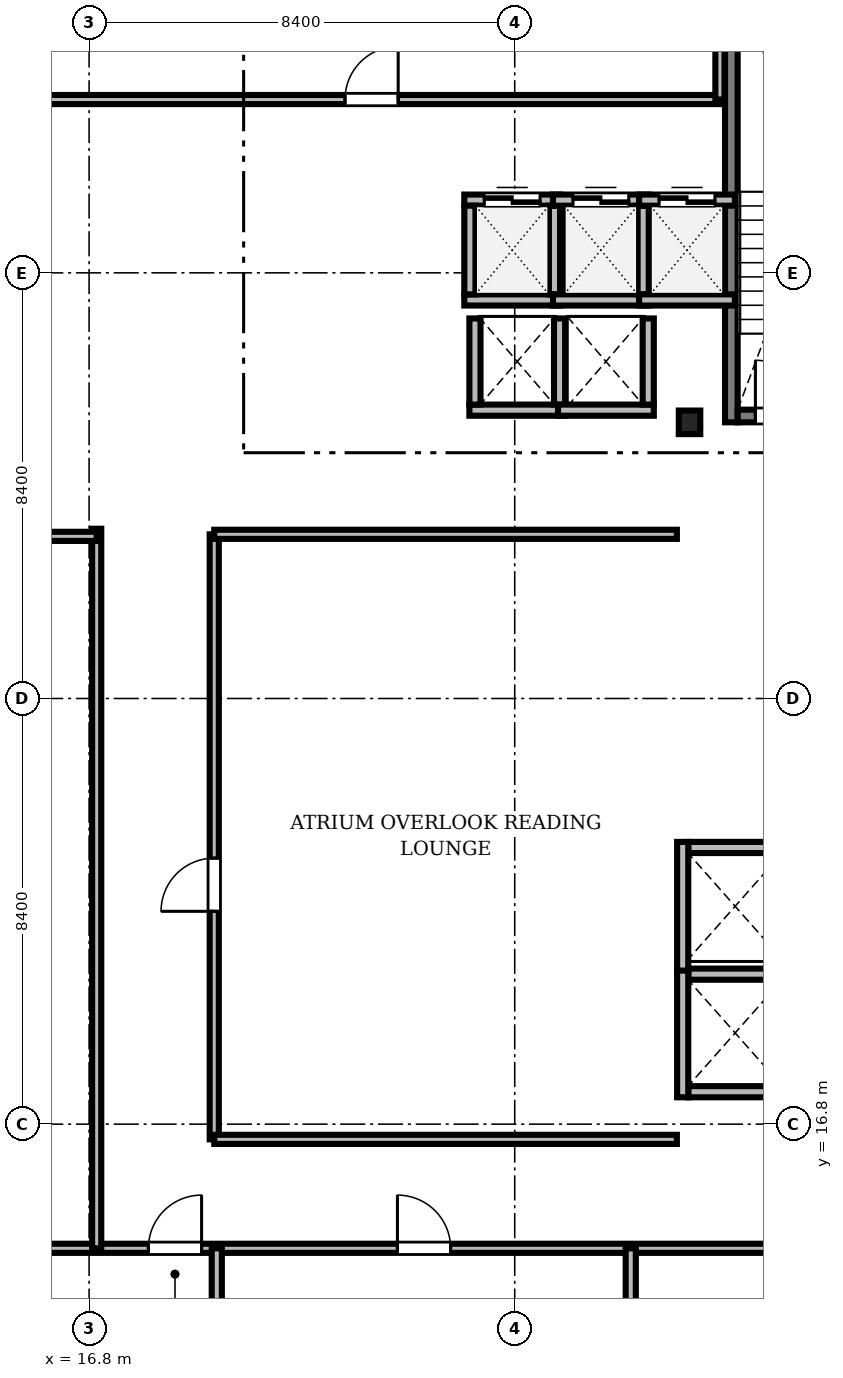
"""IFC4 building model, lengths in metres.
Left out: names, types, materials, properties, quantities, classifications, styles, units other than length and angle.
Written with IfcOpenShell. Run it as: python <this file> out.ifc"""

import sys

from ifc_helpers import new_model, si_unit, direction, frame, frame_2d, origin, origin_2d, place, context, subcontext, project, spatial, rectangle, i_section, extrude, source, transform, mapped, element, fill, save


model = new_model("IFC4")
c1 = context("Model", 3, precision=1e-05, world=origin(), true_north=direction((0.0, 1.0)))
c2 = subcontext(c1, "Body", "Model", "MODEL_VIEW")
j1 = project(units=[si_unit("LENGTHUNIT", "METRE"), si_unit("PLANEANGLEUNIT", "RADIAN")], contexts=[c1])
p1 = place(None, origin())
s1 = spatial("IfcSite", under=j1, at=p1, CompositionType="ELEMENT")
p2 = place(p1, origin())
s2 = spatial("IfcBuilding", under=s1, at=p2, CompositionType="ELEMENT")
p3 = place(p2, frame((0.0, 0.0, 163.1)))
s3 = spatial("IfcBuildingStorey", under=s2, at=p3, CompositionType="ELEMENT", Elevation=163.1)
m1 = source(origin(), c2, "Body", "SweptSolid", [
    extrude(i_section(OverallWidth=0.424, OverallDepth=0.465, WebThickness=0.035, FlangeThickness=0.056, FilletRadius=0.015, at=origin_2d()), origin(), (0.0, 0.0, 1.0), 3.05),
])
p4 = place(p3, frame((28.65, 30.65, 0.0), z_axis=(0.0, 0.0, 1.0), x_axis=(1.0, 0.0, 0.0)))
e1 = element("IfcColumn", 1, at=p4, inside=s3, PredefinedType="COLUMN", context=c2, shape_type="MappedRepresentation", body=[
    mapped(m1, transform((0.0, 0.0, 0.0), scale=1.0)),
])
m2 = source(origin(), c2, "Body", "SweptSolid", [
    extrude(rectangle(XDim=9.25, YDim=0.25, at=frame_2d((4.625, 0.0))), origin(), (0.0, 0.0, 1.0), 3.5),
])
p5 = place(p3, frame((29.475, 30.65, 0.0), z_axis=(0.0, 0.0, 1.0), x_axis=(0.0, 1.0, 0.0)))
e2 = element("IfcWall", 2, at=p5, inside=s3, PredefinedType="SOLIDWALL", context=c2, shape_type="MappedRepresentation", body=[
    mapped(m2, transform((0.0, 0.0, 0.0), scale=1.0)),
])
m3 = source(origin(), c2, "Body", "SweptSolid", [
    extrude(rectangle(XDim=3.15, YDim=0.25, at=frame_2d((1.575, 0.0))), origin(), (0.0, 0.0, 1.0), 3.5),
])
p6 = place(p3, frame((29.6, 30.775, 0.0), z_axis=(0.0, 0.0, 1.0), x_axis=(1.0, 0.0, 0.0)))
e3 = element("IfcWall", 3, at=p6, inside=s3, PredefinedType="SOLIDWALL", context=c2, shape_type="MappedRepresentation", body=[
    mapped(m3, transform((0.0, 0.0, 0.0), scale=1.0)),
])
m4 = source(origin(), c2, "Body", "SweptSolid", [
    extrude(rectangle(XDim=1.1, YDim=2.2, at=frame_2d((0.55, 1.1))), frame((0.0, 0.135, 0.0), z_axis=(0.0, -1.0, 0.0), x_axis=(1.0, 0.0, 0.0)), (0.0, 0.0, 1.0), 0.27),
])
p7 = place(p6, frame((0.35, 0.0, 0.0)))
e4 = element("IfcOpeningElement", 4, at=p7, cuts=e3, PredefinedType="OPENING", context=c2, shape_type="MappedRepresentation", body=[
    mapped(m4, transform((0.0, 0.0, 0.0), scale=1.0)),
])
m5 = source(origin(), c2, "Body", "SweptSolid", [
    extrude(rectangle(XDim=1.89, YDim=0.22, at=frame_2d((0.945, 0.0))), origin(), (0.0, 0.0, 1.0), 3.05),
])
p8 = place(p3, frame((24.205, 33.065, 0.0), z_axis=(0.0, 0.0, 1.0), x_axis=(1.0, 0.0, 0.0)))
e5 = element("IfcWall", 5, at=p8, inside=s3, PredefinedType="SOLIDWALL", context=c2, shape_type="MappedRepresentation", body=[
    mapped(m5, transform((0.0, 0.0, 0.0), scale=1.0)),
])
p9 = place(p3, frame((24.205, 35.035, 0.0), z_axis=(0.0, 0.0, 1.0), x_axis=(1.0, 0.0, 0.0)))
e6 = element("IfcWall", 6, at=p9, inside=s3, PredefinedType="SOLIDWALL", context=c2, shape_type="MappedRepresentation", body=[
    mapped(m5, transform((0.0, 0.0, 0.0), scale=1.0)),
])
m6 = source(origin(), c2, "Body", "SweptSolid", [
    extrude(rectangle(XDim=1.1, YDim=2.2, at=frame_2d((0.55, 1.1))), frame((0.0, 0.12, 0.0), z_axis=(0.0, -1.0, 0.0), x_axis=(1.0, 0.0, 0.0)), (0.0, 0.0, 1.0), 0.24),
])
p10 = place(p9, frame((0.395, 0.0, 0.0)))
e7 = element("IfcOpeningElement", 7, at=p10, cuts=e6, PredefinedType="OPENING", context=c2, shape_type="MappedRepresentation", body=[
    mapped(m6, transform((0.0, 0.0, 0.0), scale=1.0)),
])
m7 = source(origin(), c2, "Body", "SweptSolid", [
    extrude(rectangle(XDim=1.75, YDim=0.22, at=frame_2d((0.875, 0.0))), origin(), (0.0, 0.0, 1.0), 3.05),
])
for number, where, z_axis, x_axis in (
    (8, (24.315, 33.175, 0.0), (0.0, 0.0, 1.0), (0.0, 1.0, 0.0)),
    (9, (25.985, 33.175, 0.0), (0.0, 0.0, 1.0), (0.0, 1.0, 0.0)),
):
    element("IfcWall", number, at=place(p3, frame(where, z_axis=z_axis, x_axis=x_axis)), inside=s3, PredefinedType="SOLIDWALL", context=c2, shape_type="MappedRepresentation", body=[
        mapped(m7, transform((0.0, 0.0, 0.0), scale=1.0)),
    ])
p11 = place(p3, frame((25.955, 33.065, 0.0), z_axis=(0.0, 0.0, 1.0), x_axis=(1.0, 0.0, 0.0)))
e10 = element("IfcWall", 10, at=p11, inside=s3, PredefinedType="SOLIDWALL", context=c2, shape_type="MappedRepresentation", body=[
    mapped(m5, transform((0.0, 0.0, 0.0), scale=1.0)),
])
p12 = place(p3, frame((25.955, 35.035, 0.0), z_axis=(0.0, 0.0, 1.0), x_axis=(1.0, 0.0, 0.0)))
e11 = element("IfcWall", 11, at=p12, inside=s3, PredefinedType="SOLIDWALL", context=c2, shape_type="MappedRepresentation", body=[
    mapped(m5, transform((0.0, 0.0, 0.0), scale=1.0)),
])
p13 = place(p12, frame((0.395, 0.0, 0.0)))
e12 = element("IfcOpeningElement", 12, at=p13, cuts=e11, PredefinedType="OPENING", context=c2, shape_type="MappedRepresentation", body=[
    mapped(m6, transform((0.0, 0.0, 0.0), scale=1.0)),
])
p14 = place(p3, frame((27.735, 33.175, 0.0), z_axis=(0.0, 0.0, 1.0), x_axis=(0.0, 1.0, 0.0)))
e13 = element("IfcWall", 13, at=p14, inside=s3, PredefinedType="SOLIDWALL", context=c2, shape_type="MappedRepresentation", body=[
    mapped(m7, transform((0.0, 0.0, 0.0), scale=1.0)),
])
p15 = place(p3, frame((27.655, 33.065, 0.0), z_axis=(0.0, 0.0, 1.0), x_axis=(1.0, 0.0, 0.0)))
e14 = element("IfcWall", 14, at=p15, inside=s3, PredefinedType="SOLIDWALL", context=c2, shape_type="MappedRepresentation", body=[
    mapped(m5, transform((0.0, 0.0, 0.0), scale=1.0)),
])
p16 = place(p3, frame((27.655, 35.035, 0.0), z_axis=(0.0, 0.0, 1.0), x_axis=(1.0, 0.0, 0.0)))
e15 = element("IfcWall", 15, at=p16, inside=s3, PredefinedType="SOLIDWALL", context=c2, shape_type="MappedRepresentation", body=[
    mapped(m5, transform((0.0, 0.0, 0.0), scale=1.0)),
])
p17 = place(p16, frame((0.395, 0.0, 0.0)))
e16 = element("IfcOpeningElement", 16, at=p17, cuts=e15, PredefinedType="OPENING", context=c2, shape_type="MappedRepresentation", body=[
    mapped(m6, transform((0.0, 0.0, 0.0), scale=1.0)),
])
m8 = source(origin(), c2, "Body", "SweptSolid", [
    extrude(rectangle(XDim=1.89, YDim=0.22, at=frame_2d((0.945, 0.0))), origin(), (0.0, 0.0, 1.0), 3.05),
])
p18 = place(p3, frame((24.305, 30.89, 0.0), z_axis=(0.0, 0.0, 1.0), x_axis=(1.0, 0.0, 0.0)))
e17 = element("IfcWall", 17, at=p18, inside=s3, PredefinedType="SOLIDWALL", context=c2, shape_type="MappedRepresentation", body=[
    mapped(m8, transform((0.0, 0.0, 0.0), scale=1.0)),
])
m9 = source(origin(), c2, "Body", "SweptSolid", [
    extrude(rectangle(XDim=1.7, YDim=0.22, at=frame_2d((0.85, 0.0))), origin(), (0.0, 0.0, 1.0), 3.05),
])
for number, where, z_axis, x_axis in (
    (18, (24.415, 31.0, 0.0), (0.0, 0.0, 1.0), (0.0, 1.0, 0.0)),
    (19, (26.085, 31.0, 0.0), (0.0, 0.0, 1.0), (0.0, 1.0, 0.0)),
):
    element("IfcWall", number, at=place(p3, frame(where, z_axis=z_axis, x_axis=x_axis)), inside=s3, PredefinedType="SOLIDWALL", context=c2, shape_type="MappedRepresentation", body=[
        mapped(m9, transform((0.0, 0.0, 0.0), scale=1.0)),
    ])
p19 = place(p3, frame((26.055, 30.89, 0.0), z_axis=(0.0, 0.0, 1.0), x_axis=(1.0, 0.0, 0.0)))
e20 = element("IfcWall", 20, at=p19, inside=s3, PredefinedType="SOLIDWALL", context=c2, shape_type="MappedRepresentation", body=[
    mapped(m8, transform((0.0, 0.0, 0.0), scale=1.0)),
])
p20 = place(p3, frame((27.835, 31.0, 0.0), z_axis=(0.0, 0.0, 1.0), x_axis=(0.0, 1.0, 0.0)))
e21 = element("IfcWall", 21, at=p20, inside=s3, PredefinedType="SOLIDWALL", context=c2, shape_type="MappedRepresentation", body=[
    mapped(m9, transform((0.0, 0.0, 0.0), scale=1.0)),
])
m10 = source(origin(), c2, "Body", "SweptSolid", [
    extrude(rectangle(XDim=1.85, YDim=0.22, at=frame_2d((0.925, 0.0))), origin(), (0.0, 0.0, 1.0), 3.05),
])
for number, where, z_axis, x_axis in (
    (22, (28.625, 17.44, 0.0), (0.0, 0.0, 1.0), (1.0, 0.0, 0.0)),
    (23, (28.625, 19.76, 0.0), (0.0, 0.0, 1.0), (1.0, 0.0, 0.0)),
):
    element("IfcWall", number, at=place(p3, frame(where, z_axis=z_axis, x_axis=x_axis)), inside=s3, PredefinedType="SOLIDWALL", context=c2, shape_type="MappedRepresentation", body=[
        mapped(m10, transform((0.0, 0.0, 0.0), scale=1.0)),
    ])
m11 = source(origin(), c2, "Body", "SweptSolid", [
    extrude(rectangle(XDim=2.54, YDim=0.22, at=frame_2d((1.27, 0.0))), origin(), (0.0, 0.0, 1.0), 3.05),
])
p21 = place(p3, frame((28.515, 17.33, 0.0), z_axis=(0.0, 0.0, 1.0), x_axis=(0.0, 1.0, 0.0)))
e24 = element("IfcWall", 24, at=p21, inside=s3, PredefinedType="SOLIDWALL", context=c2, shape_type="MappedRepresentation", body=[
    mapped(m11, transform((0.0, 0.0, 0.0), scale=1.0)),
])
p22 = place(p3, frame((28.625, 22.26, 0.0), z_axis=(0.0, 0.0, 1.0), x_axis=(1.0, 0.0, 0.0)))
e25 = element("IfcWall", 25, at=p22, inside=s3, PredefinedType="SOLIDWALL", context=c2, shape_type="MappedRepresentation", body=[
    mapped(m10, transform((0.0, 0.0, 0.0), scale=1.0)),
])
p23 = place(p3, frame((28.515, 19.83, 0.0), z_axis=(0.0, 0.0, 1.0), x_axis=(0.0, 1.0, 0.0)))
e26 = element("IfcWall", 26, at=p23, inside=s3, PredefinedType="SOLIDWALL", context=c2, shape_type="MappedRepresentation", body=[
    mapped(m11, transform((0.0, 0.0, 0.0), scale=1.0)),
])
m12 = source(origin(), c2, "Body", "SweptSolid", [
    extrude(rectangle(XDim=46.156, YDim=0.18, at=frame_2d((23.078, 0.0))), origin(), (0.0, 0.0, 1.0), 2.326),
])
p24 = place(p3, frame((6.922, 14.35, 0.0), z_axis=(0.0, 0.0, 1.0), x_axis=(1.0, 0.0, 0.0)))
e27 = element("IfcWall", 27, at=p24, inside=s3, PredefinedType="PARTITIONING", context=c2, shape_type="MappedRepresentation", body=[
    mapped(m12, transform((0.0, 0.0, 0.0), scale=1.0)),
])
m13 = source(origin(), c2, "Body", "SweptSolid", [
    extrude(rectangle(XDim=1.05, YDim=2.2, at=frame_2d((0.525, 1.1))), frame((0.0, 0.1, 0.0), z_axis=(0.0, -1.0, 0.0), x_axis=(1.0, 0.0, 0.0)), (0.0, 0.0, 1.0), 0.2),
])
p25 = place(p24, frame((11.048, 0.0, 0.0)))
e28 = element("IfcOpeningElement", 28, at=p25, cuts=e27, PredefinedType="OPENING", context=c2, shape_type="MappedRepresentation", body=[
    mapped(m13, transform((0.0, 0.0, 0.0), scale=1.0)),
])
p26 = place(p24, frame((15.963, 0.0, 0.0)))
e29 = element("IfcOpeningElement", 29, at=p26, cuts=e27, PredefinedType="OPENING", context=c2, shape_type="MappedRepresentation", body=[
    mapped(m13, transform((0.0, 0.0, 0.0), scale=1.0)),
])
p27 = place(p24, frame((24.133, 0.0, 0.0)))
e30 = element("IfcOpeningElement", 30, at=p27, cuts=e27, PredefinedType="OPENING", context=c2, shape_type="MappedRepresentation", body=[
    mapped(m13, transform((0.0, 0.0, 0.0), scale=1.0)),
])
p28 = place(p24, frame((32.303, 0.0, 0.0)))
e31 = element("IfcOpeningElement", 31, at=p28, cuts=e27, PredefinedType="OPENING", context=c2, shape_type="MappedRepresentation", body=[
    mapped(m13, transform((0.0, 0.0, 0.0), scale=1.0)),
])
p29 = place(p24, frame((40.998, 0.0, 0.0)))
e32 = element("IfcOpeningElement", 32, at=p29, cuts=e27, PredefinedType="OPENING", context=c2, shape_type="MappedRepresentation", body=[
    mapped(m13, transform((0.0, 0.0, 0.0), scale=1.0)),
])
m14 = source(origin(), c2, "Body", "SweptSolid", [
    extrude(rectangle(XDim=22.328, YDim=0.18, at=frame_2d((11.164, 0.0))), origin(), (0.0, 0.0, 1.0), 2.326),
])
p30 = place(p3, frame((6.922, 37.02, 0.0), z_axis=(0.0, 0.0, 1.0), x_axis=(1.0, 0.0, 0.0)))
e33 = element("IfcWall", 33, at=p30, inside=s3, PredefinedType="PARTITIONING", context=c2, shape_type="MappedRepresentation", body=[
    mapped(m14, transform((0.0, 0.0, 0.0), scale=1.0)),
])
p31 = place(p30, frame((14.928, 0.0, 0.0)))
e34 = element("IfcOpeningElement", 34, at=p31, cuts=e33, PredefinedType="OPENING", context=c2, shape_type="MappedRepresentation", body=[
    mapped(m13, transform((0.0, 0.0, 0.0), scale=1.0)),
])
m15 = source(origin(), c2, "Body", "SweptSolid", [
    extrude(rectangle(XDim=11.94, YDim=0.18, at=frame_2d((5.97, 0.0))), origin(), (0.0, 0.0, 1.0), 2.492),
])
p32 = place(p3, frame((19.27, 16.5, 0.0), z_axis=(0.0, 0.0, 1.0), x_axis=(0.0, 1.0, 0.0)))
e35 = element("IfcWall", 35, at=p32, inside=s3, PredefinedType="PARTITIONING", context=c2, shape_type="MappedRepresentation", body=[
    mapped(m15, transform((0.0, 0.0, 0.0), scale=1.0)),
])
p33 = place(p32, frame((4.5, 0.0, 0.0)))
e36 = element("IfcOpeningElement", 36, at=p33, cuts=e35, PredefinedType="OPENING", context=c2, shape_type="MappedRepresentation", body=[
    mapped(m13, transform((0.0, 0.0, 0.0), scale=1.0)),
])
m16 = source(origin(), c2, "Body", "SweptSolid", [
    extrude(rectangle(XDim=14.2, YDim=0.18, at=frame_2d((7.1, 0.0))), origin(), (0.0, 0.0, 1.0), 2.492),
])
p34 = place(p3, frame((16.95, 14.35, 0.0), z_axis=(0.0, 0.0, 1.0), x_axis=(0.0, 1.0, 0.0)))
e37 = element("IfcWall", 37, at=p34, inside=s3, PredefinedType="PARTITIONING", context=c2, shape_type="MappedRepresentation", body=[
    mapped(m16, transform((0.0, 0.0, 0.0), scale=1.0)),
])
m17 = source(origin(), c2, "Body", "SweptSolid", [
    extrude(rectangle(XDim=12.228, YDim=0.2, at=frame_2d((6.114, 0.0))), origin(), (0.0, 0.0, 1.0), 2.326),
])
p35 = place(p3, frame((19.32, 2.122, 0.0), z_axis=(0.0, 0.0, 1.0), x_axis=(0.0, 1.0, 0.0)))
e38 = element("IfcWall", 38, at=p35, inside=s3, PredefinedType="PARTITIONING", context=c2, shape_type="MappedRepresentation", body=[
    mapped(m17, transform((0.0, 0.0, 0.0), scale=1.0)),
])
m18 = source(origin(), c2, "Body", "SweptSolid", [
    extrude(rectangle(XDim=12.42, YDim=0.2, at=frame_2d((6.21, 0.0))), origin(), (0.0, 0.0, 1.0), 2.326),
])
p36 = place(p3, frame((27.49, 1.93, 0.0), z_axis=(0.0, 0.0, 1.0), x_axis=(0.0, 1.0, 0.0)))
e39 = element("IfcWall", 39, at=p36, inside=s3, PredefinedType="PARTITIONING", context=c2, shape_type="MappedRepresentation", body=[
    mapped(m18, transform((0.0, 0.0, 0.0), scale=1.0)),
])
m19 = source(origin(), c2, "Body", "SweptSolid", [
    extrude(rectangle(XDim=11.45, YDim=0.18, at=frame_2d((5.725, 0.0))), origin(), (0.0, 0.0, 1.0), 2.326),
])
p37 = place(p3, frame((29.25, 37.02, 0.0), z_axis=(0.0, 0.0, 1.0), x_axis=(0.0, 1.0, 0.0)))
e40 = element("IfcWall", 40, at=p37, inside=s3, PredefinedType="PARTITIONING", context=c2, shape_type="MappedRepresentation", body=[
    mapped(m19, transform((0.0, 0.0, 0.0), scale=1.0)),
])
m20 = source(origin(), c2, "Body", "SweptSolid", [
    extrude(rectangle(XDim=10.22, YDim=0.18, at=frame_2d((5.11, 0.0))), origin(), (0.0, 0.0, 1.0), 2.326),
])
p38 = place(p3, frame((6.73, 28.4, 0.0), z_axis=(0.0, 0.0, 1.0), x_axis=(1.0, 0.0, 0.0)))
e41 = element("IfcWall", 41, at=p38, inside=s3, PredefinedType="PARTITIONING", context=c2, shape_type="MappedRepresentation", body=[
    mapped(m20, transform((0.0, 0.0, 0.0), scale=1.0)),
])
m21 = source(origin(), c2, "Body", "SweptSolid", [
    extrude(rectangle(XDim=9.13, YDim=0.18, at=frame_2d((4.565, 0.0))), origin(), (0.0, 0.0, 1.0), 3.05),
])
for number, where, z_axis, x_axis in (
    (42, (19.27, 16.5, 0.0), (0.0, 0.0, 1.0), (1.0, 0.0, 0.0)),
    (43, (19.27, 28.44, 0.0), (0.0, 0.0, 1.0), (1.0, 0.0, 0.0)),
):
    element("IfcWall", number, at=place(p3, frame(where, z_axis=z_axis, x_axis=x_axis)), inside=s3, PredefinedType="PARTITIONING", context=c2, shape_type="MappedRepresentation", body=[
        mapped(m21, transform((0.0, 0.0, 0.0), scale=1.0)),
    ])
m22 = source(origin(), c2, "Body", "SweptSolid", [
    extrude(rectangle(XDim=1.1, YDim=2.2, at=frame_2d((0.55, 1.1))), frame((0.0, 0.025, 0.0), z_axis=(0.0, -1.0, 0.0), x_axis=(1.0, 0.0, 0.0)), (0.0, 0.0, 1.0), 0.05),
])
p39 = place(p7, origin())
e44 = element("IfcDoor", 44, at=p39, inside=s3, OperationType="SINGLE_SWING_LEFT", PredefinedType="DOOR", context=c2, shape_type="MappedRepresentation", body=[
    mapped(m22, transform((0.0, 0.0, 0.0), scale=1.0)),
])
fill(e4, e44)
p40 = place(p10, origin())
e45 = element("IfcDoor", 45, at=p40, inside=s3, OperationType="DOUBLE_DOOR_SLIDING", PredefinedType="DOOR", context=c2, shape_type="MappedRepresentation", body=[
    mapped(m22, transform((0.0, 0.0, 0.0), scale=1.0)),
])
fill(e7, e45)
p41 = place(p13, origin())
e46 = element("IfcDoor", 46, at=p41, inside=s3, OperationType="DOUBLE_DOOR_SLIDING", PredefinedType="DOOR", context=c2, shape_type="MappedRepresentation", body=[
    mapped(m22, transform((0.0, 0.0, 0.0), scale=1.0)),
])
fill(e12, e46)
p42 = place(p17, origin())
e47 = element("IfcDoor", 47, at=p42, inside=s3, OperationType="DOUBLE_DOOR_SLIDING", PredefinedType="DOOR", context=c2, shape_type="MappedRepresentation", body=[
    mapped(m22, transform((0.0, 0.0, 0.0), scale=1.0)),
])
fill(e16, e47)
m23 = source(origin(), c2, "Body", "SweptSolid", [
    extrude(rectangle(XDim=1.05, YDim=2.2, at=frame_2d((0.525, 1.1))), frame((0.0, 0.025, 0.0), z_axis=(0.0, -1.0, 0.0), x_axis=(1.0, 0.0, 0.0)), (0.0, 0.0, 1.0), 0.05),
])
p43 = place(p25, origin())
e48 = element("IfcDoor", 48, at=p43, inside=s3, OperationType="SINGLE_SWING_RIGHT", PredefinedType="DOOR", context=c2, shape_type="MappedRepresentation", body=[
    mapped(m23, transform((0.0, 0.0, 0.0), scale=1.0)),
])
fill(e28, e48)
p44 = place(p26, origin())
e49 = element("IfcDoor", 49, at=p44, inside=s3, OperationType="SINGLE_SWING_LEFT", PredefinedType="DOOR", context=c2, shape_type="MappedRepresentation", body=[
    mapped(m23, transform((0.0, 0.0, 0.0), scale=1.0)),
])
fill(e29, e49)
p45 = place(p31, origin())
e50 = element("IfcDoor", 50, at=p45, inside=s3, OperationType="SINGLE_SWING_RIGHT", PredefinedType="DOOR", context=c2, shape_type="MappedRepresentation", body=[
    mapped(m23, transform((0.0, 0.0, 0.0), scale=1.0)),
])
fill(e34, e50)
p46 = place(p33, origin())
e51 = element("IfcDoor", 51, at=p46, inside=s3, OperationType="SINGLE_SWING_LEFT", PredefinedType="DOOR", context=c2, shape_type="MappedRepresentation", body=[
    mapped(m23, transform((0.0, 0.0, 0.0), scale=1.0)),
])
fill(e36, e51)
save(model, sys.argv[1])
